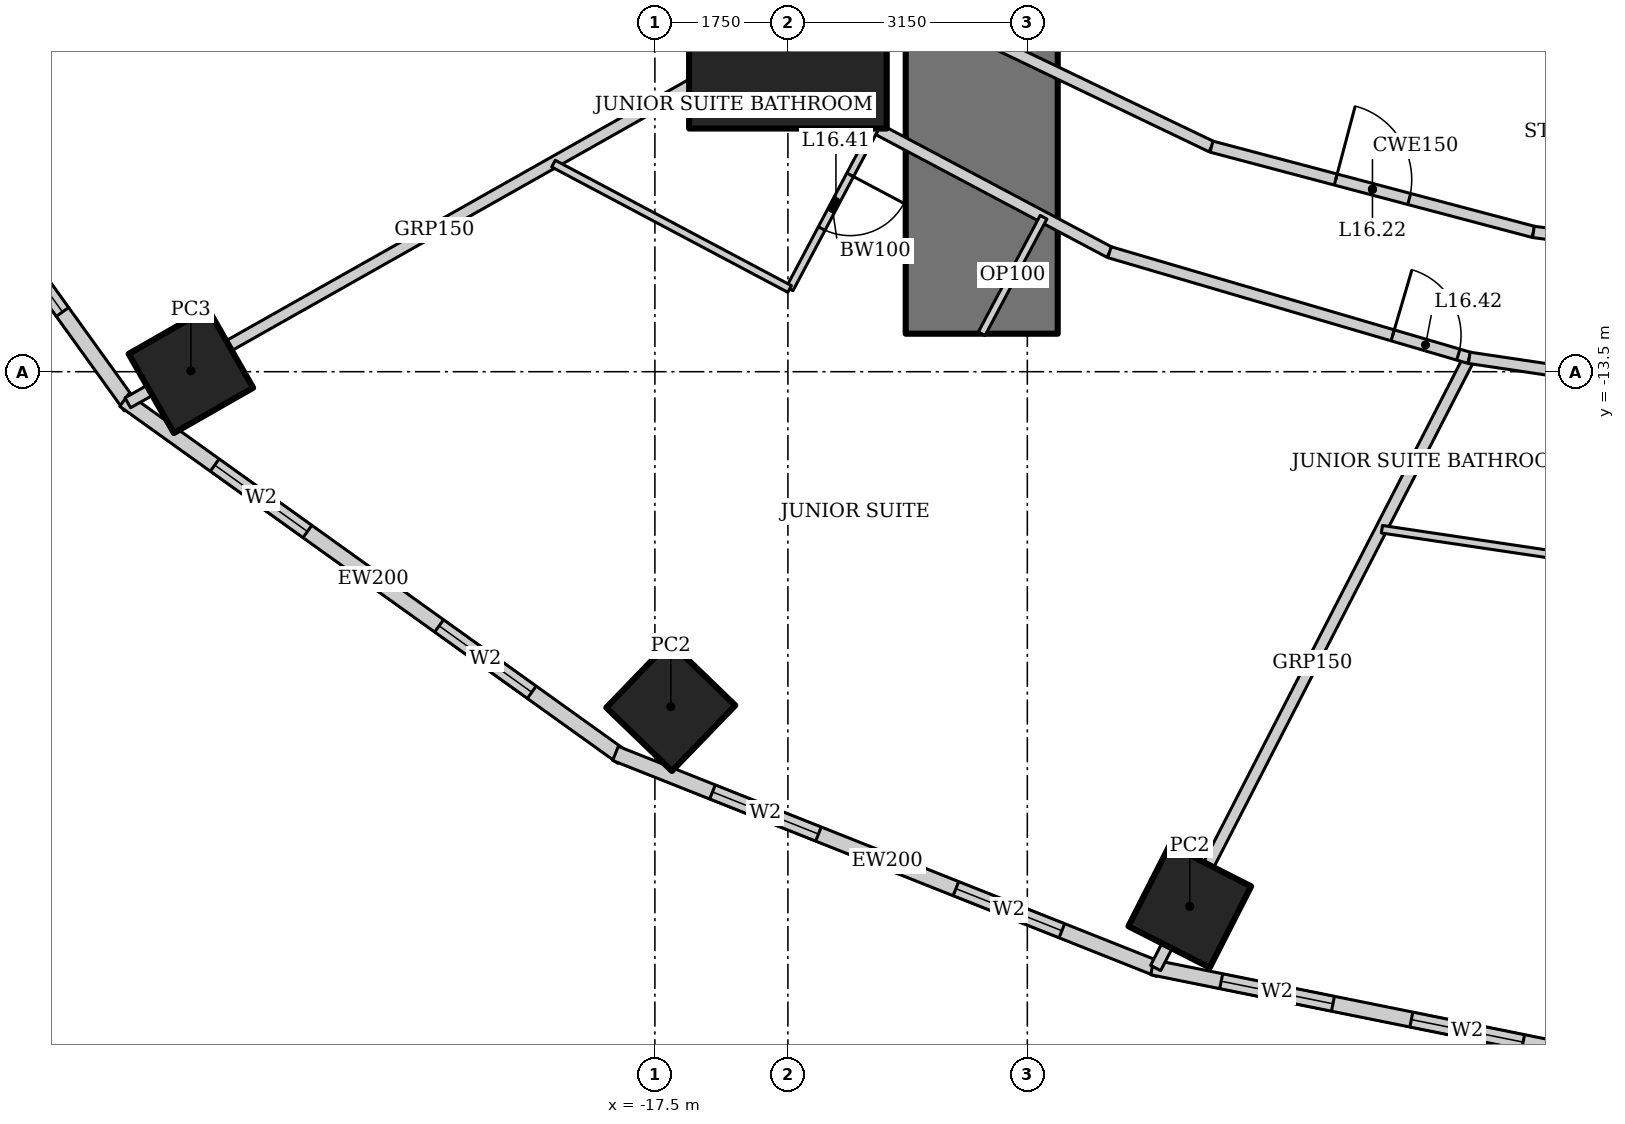
"""IFC4 building model, lengths in metres.
Left out: names, types, materials, properties, quantities, classifications, styles, units other than length and angle.
Written with IfcOpenShell. Run it as: python <this file> out.ifc"""

import sys

from ifc_helpers import new_model, si_unit, direction, frame, frame_2d, origin, origin_2d, place, context, subcontext, project, spatial, rectangle, hollow_rectangle, extrude, element, fill, save


model = new_model("IFC4")
c1 = context("Model", 3, precision=1e-05, world=origin(), true_north=direction((0.0, 1.0)))
c2 = subcontext(c1, "Body", "Model", "MODEL_VIEW")
j1 = project(units=[si_unit("LENGTHUNIT", "METRE"), si_unit("PLANEANGLEUNIT", "RADIAN")], contexts=[c1])
p1 = place(None, origin())
s1 = spatial("IfcSite", under=j1, at=p1, CompositionType="ELEMENT")
p2 = place(p1, origin())
s2 = spatial("IfcBuilding", under=s1, at=p2, CompositionType="ELEMENT")
p3 = place(p2, frame((0.0, 0.0, 73.0)))
s3 = spatial("IfcBuildingStorey", under=s2, at=p3, CompositionType="ELEMENT", Elevation=73.0)
p4 = place(p3, frame((-15.75, -9.0, 0.0), z_axis=(0.0, 0.0, 1.0), x_axis=(1.0, 0.0, 0.0)))
e1 = element("IfcColumn", 1, at=p4, inside=s3, PredefinedType="COLUMN", context=c2, shape_type="SweptSolid", body=[
    extrude(hollow_rectangle(XDim=2.6, YDim=2.6, WallThickness=0.13, at=origin_2d()), origin(), (0.0, 0.0, 1.0), 3.6),
])
p5 = place(p3, frame((-23.605, -13.489, 0.0), z_axis=(0.0, 0.0, 1.0), x_axis=(0.86824298017, 0.496139221777, 0.0)))
e2 = element("IfcColumn", 2, at=p5, inside=s3, PredefinedType="COLUMN", context=c2, shape_type="SweptSolid", body=[
    extrude(hollow_rectangle(XDim=1.2, YDim=1.2, WallThickness=0.12, at=origin_2d()), origin(), (0.0, 0.0, 1.0), 3.6),
])
for number, where, z_axis, x_axis in (
    (3, (-17.291, -17.905, 0.0), (0.0, 0.0, 1.0), (0.695, 0.719, 0.0)),
    (4, (-10.463, -20.534, 0.0), (0.0, 0.0, 1.0), (0.454, 0.891, 0.0)),
):
    element("IfcColumn", number, at=place(p3, frame(where, z_axis=z_axis, x_axis=x_axis)), inside=s3, PredefinedType="COLUMN", context=c2, shape_type="SweptSolid", body=[
        extrude(hollow_rectangle(XDim=1.2, YDim=1.2, WallThickness=0.1, at=origin_2d()), origin(), (0.0, 0.0, 1.0), 3.6),
    ])
p6 = place(p3, frame((-13.2, 13.0, 0.0), z_axis=(0.0, 0.0, 1.0), x_axis=(0.0, -1.0, 0.0)))
e5 = element("IfcWall", 5, at=p6, inside=s3, PredefinedType="SHEAR", context=c2, shape_type="SweptSolid", body=[
    extrude(rectangle(XDim=26.0, YDim=2.0, at=frame_2d((13.0, 0.0))), origin(), (0.0, 0.0, 1.0), 3.6),
])
p7 = place(p6, frame((12.1, 0.0, 0.0)))
e6 = element("IfcOpeningElement", 6, at=p7, cuts=e5, PredefinedType="OPENING", context=c2, shape_type="SweptSolid", body=[
    extrude(rectangle(XDim=1.8, YDim=2.1, at=frame_2d((0.9, 1.05))), frame((0.0, 1.01, 0.0), z_axis=(0.0, -1.0, 0.0), x_axis=(1.0, 0.0, 0.0)), (0.0, 0.0, 1.0), 2.02),
])
p8 = place(p3, frame((-29.26, -7.2, 0.0), z_axis=(0.0, 0.0, 1.0), x_axis=(0.583937613703, -0.811798536155, 0.0)))
e7 = element("IfcWall", 7, at=p8, inside=s3, PredefinedType="SOLIDWALL", context=c2, shape_type="SweptSolid", body=[
    extrude(rectangle(XDim=8.323, YDim=0.2, at=frame_2d((4.162, 0.0))), origin(), (0.0, 0.0, 1.0), 3.45),
])
p9 = place(p8, frame((1.531, 0.0, 0.5)))
e8 = element("IfcOpeningElement", 8, at=p9, cuts=e7, PredefinedType="OPENING", context=c2, shape_type="SweptSolid", body=[
    extrude(rectangle(XDim=1.5, YDim=2.2, at=frame_2d((0.75, 1.1))), frame((0.0, 0.11, 0.0), z_axis=(0.0, -1.0, 0.0), x_axis=(1.0, 0.0, 0.0)), (0.0, 0.0, 1.0), 0.22),
])
p10 = place(p8, frame((5.292, 0.0, 0.5)))
e9 = element("IfcOpeningElement", 9, at=p10, cuts=e7, PredefinedType="OPENING", context=c2, shape_type="SweptSolid", body=[
    extrude(rectangle(XDim=1.5, YDim=2.2, at=frame_2d((0.75, 1.1))), frame((0.0, 0.11, 0.0), z_axis=(0.0, -1.0, 0.0), x_axis=(1.0, 0.0, 0.0)), (0.0, 0.0, 1.0), 0.22),
])
p11 = place(p3, frame((-24.482, -13.875, 0.0), z_axis=(0.0, 0.0, 1.0), x_axis=(0.812791321576, -0.582554948112, 0.0)))
e10 = element("IfcWall", 10, at=p11, inside=s3, PredefinedType="SOLIDWALL", context=c2, shape_type="SweptSolid", body=[
    extrude(rectangle(XDim=8.063, YDim=0.2, at=frame_2d((4.032, 0.0))), origin(), (0.0, 0.0, 1.0), 3.45),
])
p12 = place(p11, frame((1.466, 0.0, 0.5)))
e11 = element("IfcOpeningElement", 11, at=p12, cuts=e10, PredefinedType="OPENING", context=c2, shape_type="SweptSolid", body=[
    extrude(rectangle(XDim=1.5, YDim=2.2, at=frame_2d((0.75, 1.1))), frame((0.0, 0.11, 0.0), z_axis=(0.0, -1.0, 0.0), x_axis=(1.0, 0.0, 0.0)), (0.0, 0.0, 1.0), 0.22),
])
p13 = place(p11, frame((5.097, 0.0, 0.5)))
e12 = element("IfcOpeningElement", 12, at=p13, cuts=e10, PredefinedType="OPENING", context=c2, shape_type="SweptSolid", body=[
    extrude(rectangle(XDim=1.5, YDim=2.2, at=frame_2d((0.75, 1.1))), frame((0.0, 0.11, 0.0), z_axis=(0.0, -1.0, 0.0), x_axis=(1.0, 0.0, 0.0)), (0.0, 0.0, 1.0), 0.22),
])
p14 = place(p3, frame((-18.018, -18.523, 0.0), z_axis=(0.0, 0.0, 1.0), x_axis=(0.929358351251, -0.369178892895, 0.0)))
e13 = element("IfcWall", 13, at=p14, inside=s3, PredefinedType="SOLIDWALL", context=c2, shape_type="SweptSolid", body=[
    extrude(rectangle(XDim=7.692, YDim=0.2, at=frame_2d((3.846, 0.0))), origin(), (0.0, 0.0, 1.0), 3.45),
])
p15 = place(p14, frame((1.373, 0.0, 0.5)))
e14 = element("IfcOpeningElement", 14, at=p15, cuts=e13, PredefinedType="OPENING", context=c2, shape_type="SweptSolid", body=[
    extrude(rectangle(XDim=1.5, YDim=2.2, at=frame_2d((0.75, 1.1))), frame((0.0, 0.11, 0.0), z_axis=(0.0, -1.0, 0.0), x_axis=(1.0, 0.0, 0.0)), (0.0, 0.0, 1.0), 0.22),
])
p16 = place(p14, frame((4.819, 0.0, 0.5)))
e15 = element("IfcOpeningElement", 15, at=p16, cuts=e13, PredefinedType="OPENING", context=c2, shape_type="SweptSolid", body=[
    extrude(rectangle(XDim=1.5, YDim=2.2, at=frame_2d((0.75, 1.1))), frame((0.0, 0.11, 0.0), z_axis=(0.0, -1.0, 0.0), x_axis=(1.0, 0.0, 0.0)), (0.0, 0.0, 1.0), 0.22),
])
p17 = place(p3, frame((-10.957, -21.337, 0.0), z_axis=(0.0, 0.0, 1.0), x_axis=(0.980251657452, -0.197754110105, 0.0)))
e16 = element("IfcWall", 16, at=p17, inside=s3, PredefinedType="SOLIDWALL", context=c2, shape_type="SweptSolid", body=[
    extrude(rectangle(XDim=5.904, YDim=0.2, at=frame_2d((2.952, 0.0))), origin(), (0.0, 0.0, 1.0), 3.45),
])
p18 = place(p17, frame((0.926, 0.0, 0.5)))
e17 = element("IfcOpeningElement", 17, at=p18, cuts=e16, PredefinedType="OPENING", context=c2, shape_type="SweptSolid", body=[
    extrude(rectangle(XDim=1.5, YDim=2.2, at=frame_2d((0.75, 1.1))), frame((0.0, 0.11, 0.0), z_axis=(0.0, -1.0, 0.0), x_axis=(1.0, 0.0, 0.0)), (0.0, 0.0, 1.0), 0.22),
])
p19 = place(p17, frame((3.478, 0.0, 0.5)))
e18 = element("IfcOpeningElement", 18, at=p19, cuts=e16, PredefinedType="OPENING", context=c2, shape_type="SweptSolid", body=[
    extrude(rectangle(XDim=1.5, YDim=2.2, at=frame_2d((0.75, 1.1))), frame((0.0, 0.11, 0.0), z_axis=(0.0, -1.0, 0.0), x_axis=(1.0, 0.0, 0.0)), (0.0, 0.0, 1.0), 0.22),
])
p20 = place(p3, frame((-24.435, -13.909, 0.0), z_axis=(0.0, 0.0, 1.0), x_axis=(0.870744406136, 0.491735883563, 0.0)))
e19 = element("IfcWall", 19, at=p20, inside=s3, PredefinedType="PARTITIONING", context=c2, shape_type="SweptSolid", body=[
    extrude(rectangle(XDim=9.263, YDim=0.15, at=frame_2d((4.631, 0.0))), origin(), (0.0, 0.0, 1.0), 2.693),
])
p21 = place(p3, frame((-10.912, -21.346, 0.0), z_axis=(0.0, 0.0, 1.0), x_axis=(0.457117602022, 0.889406261458, 0.0)))
e20 = element("IfcWall", 20, at=p21, inside=s3, PredefinedType="PARTITIONING", context=c2, shape_type="SweptSolid", body=[
    extrude(rectangle(XDim=9.027, YDim=0.15, at=frame_2d((4.513, 0.0))), origin(), (0.0, 0.0, 1.0), 2.528),
])
p22 = place(p3, frame((-20.484, -5.107, 0.0), z_axis=(0.0, 0.0, 1.0), x_axis=(0.695871090686, -0.71816671125, 0.0)))
e21 = element("IfcWall", 21, at=p22, inside=s3, PredefinedType="PARTITIONING", context=c2, shape_type="SweptSolid", body=[
    extrude(rectangle(XDim=5.913, YDim=0.15, at=frame_2d((2.957, 0.0))), origin(), (0.0, 0.0, 1.0), 3.45),
])
p23 = place(p22, frame((0.15, 0.0, 0.0)))
e22 = element("IfcOpeningElement", 22, at=p23, cuts=e21, PredefinedType="OPENING", context=c2, shape_type="SweptSolid", body=[
    extrude(rectangle(XDim=0.9, YDim=2.1, at=frame_2d((0.45, 1.05))), frame((0.0, 0.085, 0.0), z_axis=(0.0, -1.0, 0.0), x_axis=(1.0, 0.0, 0.0)), (0.0, 0.0, 1.0), 0.17),
])
p24 = place(p3, frame((-16.369, -9.354, 0.0), z_axis=(0.0, 0.0, 1.0), x_axis=(0.883334368785, -0.468743419071, 0.0)))
e23 = element("IfcWall", 23, at=p24, inside=s3, PredefinedType="PARTITIONING", context=c2, shape_type="SweptSolid", body=[
    extrude(rectangle(XDim=5.491, YDim=0.15, at=frame_2d((2.746, 0.0))), origin(), (0.0, 0.0, 1.0), 3.45),
])
p25 = place(p3, frame((-11.519, -11.928, 0.0), z_axis=(0.0, 0.0, 1.0), x_axis=(0.959496227294, -0.281721475589, 0.0)))
e24 = element("IfcWall", 24, at=p25, inside=s3, PredefinedType="PARTITIONING", context=c2, shape_type="SweptSolid", body=[
    extrude(rectangle(XDim=4.933, YDim=0.15, at=frame_2d((2.466, 0.0))), origin(), (0.0, 0.0, 1.0), 3.45),
])
p26 = place(p25, frame((3.883, 0.0, 0.0)))
e25 = element("IfcOpeningElement", 25, at=p26, cuts=e24, PredefinedType="OPENING", context=c2, shape_type="SweptSolid", body=[
    extrude(rectangle(XDim=0.9, YDim=2.1, at=frame_2d((0.45, 1.05))), frame((0.0, 0.085, 0.0), z_axis=(0.0, -1.0, 0.0), x_axis=(1.0, 0.0, 0.0)), (0.0, 0.0, 1.0), 0.17),
])
p27 = place(p3, frame((-6.786, -13.317, 0.0), z_axis=(0.0, 0.0, 1.0), x_axis=(0.989107488999, -0.14719502439, 0.0)))
e26 = element("IfcWall", 26, at=p27, inside=s3, PredefinedType="PARTITIONING", context=c2, shape_type="SweptSolid", body=[
    extrude(rectangle(XDim=3.627, YDim=0.15, at=frame_2d((1.814, 0.0))), origin(), (0.0, 0.0, 1.0), 3.45),
])
p28 = place(p3, frame((-14.673, -8.385, 0.0), z_axis=(0.0, 0.0, 1.0), x_axis=(0.901869692799, -0.43200816799, 0.0)))
e27 = element("IfcWall", 27, at=p28, inside=s3, PredefinedType="PARTITIONING", context=c2, shape_type="SweptSolid", body=[
    extrude(rectangle(XDim=4.986, YDim=0.15, at=frame_2d((2.493, 0.0))), origin(), (0.0, 0.0, 1.0), 3.45),
])
p29 = place(p3, frame((-10.177, -10.539, 0.0), z_axis=(0.0, 0.0, 1.0), x_axis=(0.966672790407, -0.256015070428, 0.0)))
e28 = element("IfcWall", 28, at=p29, inside=s3, PredefinedType="PARTITIONING", context=c2, shape_type="SweptSolid", body=[
    extrude(rectangle(XDim=4.382, YDim=0.15, at=frame_2d((2.191, 0.0))), origin(), (0.0, 0.0, 1.0), 3.45),
])
p30 = place(p29, frame((1.691, 0.0, 0.0)))
e29 = element("IfcOpeningElement", 29, at=p30, cuts=e28, PredefinedType="OPENING", context=c2, shape_type="SweptSolid", body=[
    extrude(rectangle(XDim=1.0, YDim=2.1, at=frame_2d((0.5, 1.05))), frame((0.0, 0.085, 0.0), z_axis=(0.0, -1.0, 0.0), x_axis=(1.0, 0.0, 0.0)), (0.0, 0.0, 1.0), 0.17),
])
p31 = place(p3, frame((-5.941, -11.66, 0.0), z_axis=(0.0, 0.0, 1.0), x_axis=(0.991129053928, -0.13290296633, 0.0)))
e30 = element("IfcWall", 30, at=p31, inside=s3, PredefinedType="PARTITIONING", context=c2, shape_type="SweptSolid", body=[
    extrude(rectangle(XDim=3.18, YDim=0.15, at=frame_2d((1.59, 0.0))), origin(), (0.0, 0.0, 1.0), 3.45),
])
p32 = place(p3, frame((-14.602, -10.291, 0.0), z_axis=(0.0, 0.0, 1.0), x_axis=(-0.468770886208, -0.883319792739, 0.0)))
e31 = element("IfcWall", 31, at=p32, inside=s3, PredefinedType="PARTITIONING", context=c2, shape_type="SweptSolid", body=[
    extrude(rectangle(XDim=2.4, YDim=0.1, at=frame_2d((1.2, 0.0))), origin(), (0.0, 0.0, 1.0), 3.45),
])
p33 = place(p32, frame((0.7, 0.0, 0.0)))
e32 = element("IfcOpeningElement", 32, at=p33, cuts=e31, PredefinedType="OPENING", context=c2, shape_type="SweptSolid", body=[
    extrude(rectangle(XDim=0.8, YDim=2.1, at=frame_2d((0.4, 1.05))), frame((0.0, 0.06, 0.0), z_axis=(0.0, -1.0, 0.0), x_axis=(1.0, 0.0, 0.0)), (0.0, 0.0, 1.0), 0.12),
])
p34 = place(p3, frame((-15.727, -12.411, 0.0), z_axis=(0.0, 0.0, 1.0), x_axis=(-0.88335195308, 0.468710280439, 0.0)))
e33 = element("IfcWall", 33, at=p34, inside=s3, PredefinedType="PARTITIONING", context=c2, shape_type="SweptSolid", body=[
    extrude(rectangle(XDim=3.518, YDim=0.1, at=frame_2d((1.759, 0.0))), origin(), (0.0, 0.0, 1.0), 3.45),
])
p35 = place(p3, frame((-5.161, -15.986, 0.0), z_axis=(0.0, 0.0, 1.0), x_axis=(-0.98910744157, 0.147195343104, 0.0)))
e34 = element("IfcWall", 34, at=p35, inside=s3, PredefinedType="PARTITIONING", context=c2, shape_type="SweptSolid", body=[
    extrude(rectangle(XDim=2.805, YDim=0.1, at=frame_2d((1.402, 0.0))), origin(), (0.0, 0.0, 1.0), 3.45),
])
p36 = place(p3, frame((-13.2, -13.0, 0.0), z_axis=(0.0, 0.0, 1.0), x_axis=(0.46874717052, 0.88333237806, 0.0)))
e35 = element("IfcWall", 35, at=p36, inside=s3, PredefinedType="PARTITIONING", context=c2, shape_type="SweptSolid", body=[
    extrude(rectangle(XDim=1.735, YDim=0.1, at=frame_2d((0.868, 0.0))), origin(), (0.0, 0.0, 1.0), 3.45),
])
p37 = place(p10, origin())
e36 = element("IfcWindow", 36, at=p37, inside=s3, PartitioningType="SINGLE_PANEL", PredefinedType="WINDOW", context=c2, shape_type="SweptSolid", body=[
    extrude(rectangle(XDim=1.5, YDim=2.2, at=frame_2d((0.75, 1.1))), frame((0.0, 0.03, 0.0), z_axis=(0.0, -1.0, 0.0), x_axis=(1.0, 0.0, 0.0)), (0.0, 0.0, 1.0), 0.06),
])
fill(e9, e36)
p38 = place(p12, origin())
e37 = element("IfcWindow", 37, at=p38, inside=s3, PartitioningType="SINGLE_PANEL", PredefinedType="WINDOW", context=c2, shape_type="SweptSolid", body=[
    extrude(rectangle(XDim=1.5, YDim=2.2, at=frame_2d((0.75, 1.1))), frame((0.0, 0.03, 0.0), z_axis=(0.0, -1.0, 0.0), x_axis=(1.0, 0.0, 0.0)), (0.0, 0.0, 1.0), 0.06),
])
fill(e11, e37)
p39 = place(p13, origin())
e38 = element("IfcWindow", 38, at=p39, inside=s3, PartitioningType="SINGLE_PANEL", PredefinedType="WINDOW", context=c2, shape_type="SweptSolid", body=[
    extrude(rectangle(XDim=1.5, YDim=2.2, at=frame_2d((0.75, 1.1))), frame((0.0, 0.03, 0.0), z_axis=(0.0, -1.0, 0.0), x_axis=(1.0, 0.0, 0.0)), (0.0, 0.0, 1.0), 0.06),
])
fill(e12, e38)
p40 = place(p15, origin())
e39 = element("IfcWindow", 39, at=p40, inside=s3, PartitioningType="SINGLE_PANEL", PredefinedType="WINDOW", context=c2, shape_type="SweptSolid", body=[
    extrude(rectangle(XDim=1.5, YDim=2.2, at=frame_2d((0.75, 1.1))), frame((0.0, 0.03, 0.0), z_axis=(0.0, -1.0, 0.0), x_axis=(1.0, 0.0, 0.0)), (0.0, 0.0, 1.0), 0.06),
])
fill(e14, e39)
p41 = place(p16, origin())
e40 = element("IfcWindow", 40, at=p41, inside=s3, PartitioningType="SINGLE_PANEL", PredefinedType="WINDOW", context=c2, shape_type="SweptSolid", body=[
    extrude(rectangle(XDim=1.5, YDim=2.2, at=frame_2d((0.75, 1.1))), frame((0.0, 0.03, 0.0), z_axis=(0.0, -1.0, 0.0), x_axis=(1.0, 0.0, 0.0)), (0.0, 0.0, 1.0), 0.06),
])
fill(e15, e40)
p42 = place(p18, origin())
e41 = element("IfcWindow", 41, at=p42, inside=s3, PartitioningType="SINGLE_PANEL", PredefinedType="WINDOW", context=c2, shape_type="SweptSolid", body=[
    extrude(rectangle(XDim=1.5, YDim=2.2, at=frame_2d((0.75, 1.1))), frame((0.0, 0.03, 0.0), z_axis=(0.0, -1.0, 0.0), x_axis=(1.0, 0.0, 0.0)), (0.0, 0.0, 1.0), 0.06),
])
fill(e17, e41)
p43 = place(p19, origin())
e42 = element("IfcWindow", 42, at=p43, inside=s3, PartitioningType="SINGLE_PANEL", PredefinedType="WINDOW", context=c2, shape_type="SweptSolid", body=[
    extrude(rectangle(XDim=1.5, YDim=2.2, at=frame_2d((0.75, 1.1))), frame((0.0, 0.03, 0.0), z_axis=(0.0, -1.0, 0.0), x_axis=(1.0, 0.0, 0.0)), (0.0, 0.0, 1.0), 0.06),
])
fill(e18, e42)
p44 = place(p30, origin())
e43 = element("IfcDoor", 43, at=p44, inside=s3, OperationType="SINGLE_SWING_LEFT", PredefinedType="DOOR", context=c2, shape_type="SweptSolid", body=[
    extrude(rectangle(XDim=1.0, YDim=2.1, at=frame_2d((0.5, 1.05))), frame((0.0, 0.025, 0.0), z_axis=(0.0, -1.0, 0.0), x_axis=(1.0, 0.0, 0.0)), (0.0, 0.0, 1.0), 0.05),
])
fill(e29, e43)
p45 = place(p33, origin())
e44 = element("IfcDoor", 44, at=p45, inside=s3, OperationType="SINGLE_SWING_LEFT", PredefinedType="DOOR", context=c2, shape_type="SweptSolid", body=[
    extrude(rectangle(XDim=0.8, YDim=2.1, at=frame_2d((0.4, 1.05))), frame((0.0, 0.025, 0.0), z_axis=(0.0, -1.0, 0.0), x_axis=(1.0, 0.0, 0.0)), (0.0, 0.0, 1.0), 0.05),
])
fill(e32, e44)
p46 = place(p26, origin())
e45 = element("IfcDoor", 45, at=p46, inside=s3, OperationType="SINGLE_SWING_LEFT", PredefinedType="DOOR", context=c2, shape_type="SweptSolid", body=[
    extrude(rectangle(XDim=0.9, YDim=2.1, at=frame_2d((0.45, 1.05))), frame((0.0, 0.025, 0.0), z_axis=(0.0, -1.0, 0.0), x_axis=(1.0, 0.0, 0.0)), (0.0, 0.0, 1.0), 0.05),
])
fill(e25, e45)
save(model, sys.argv[1])
